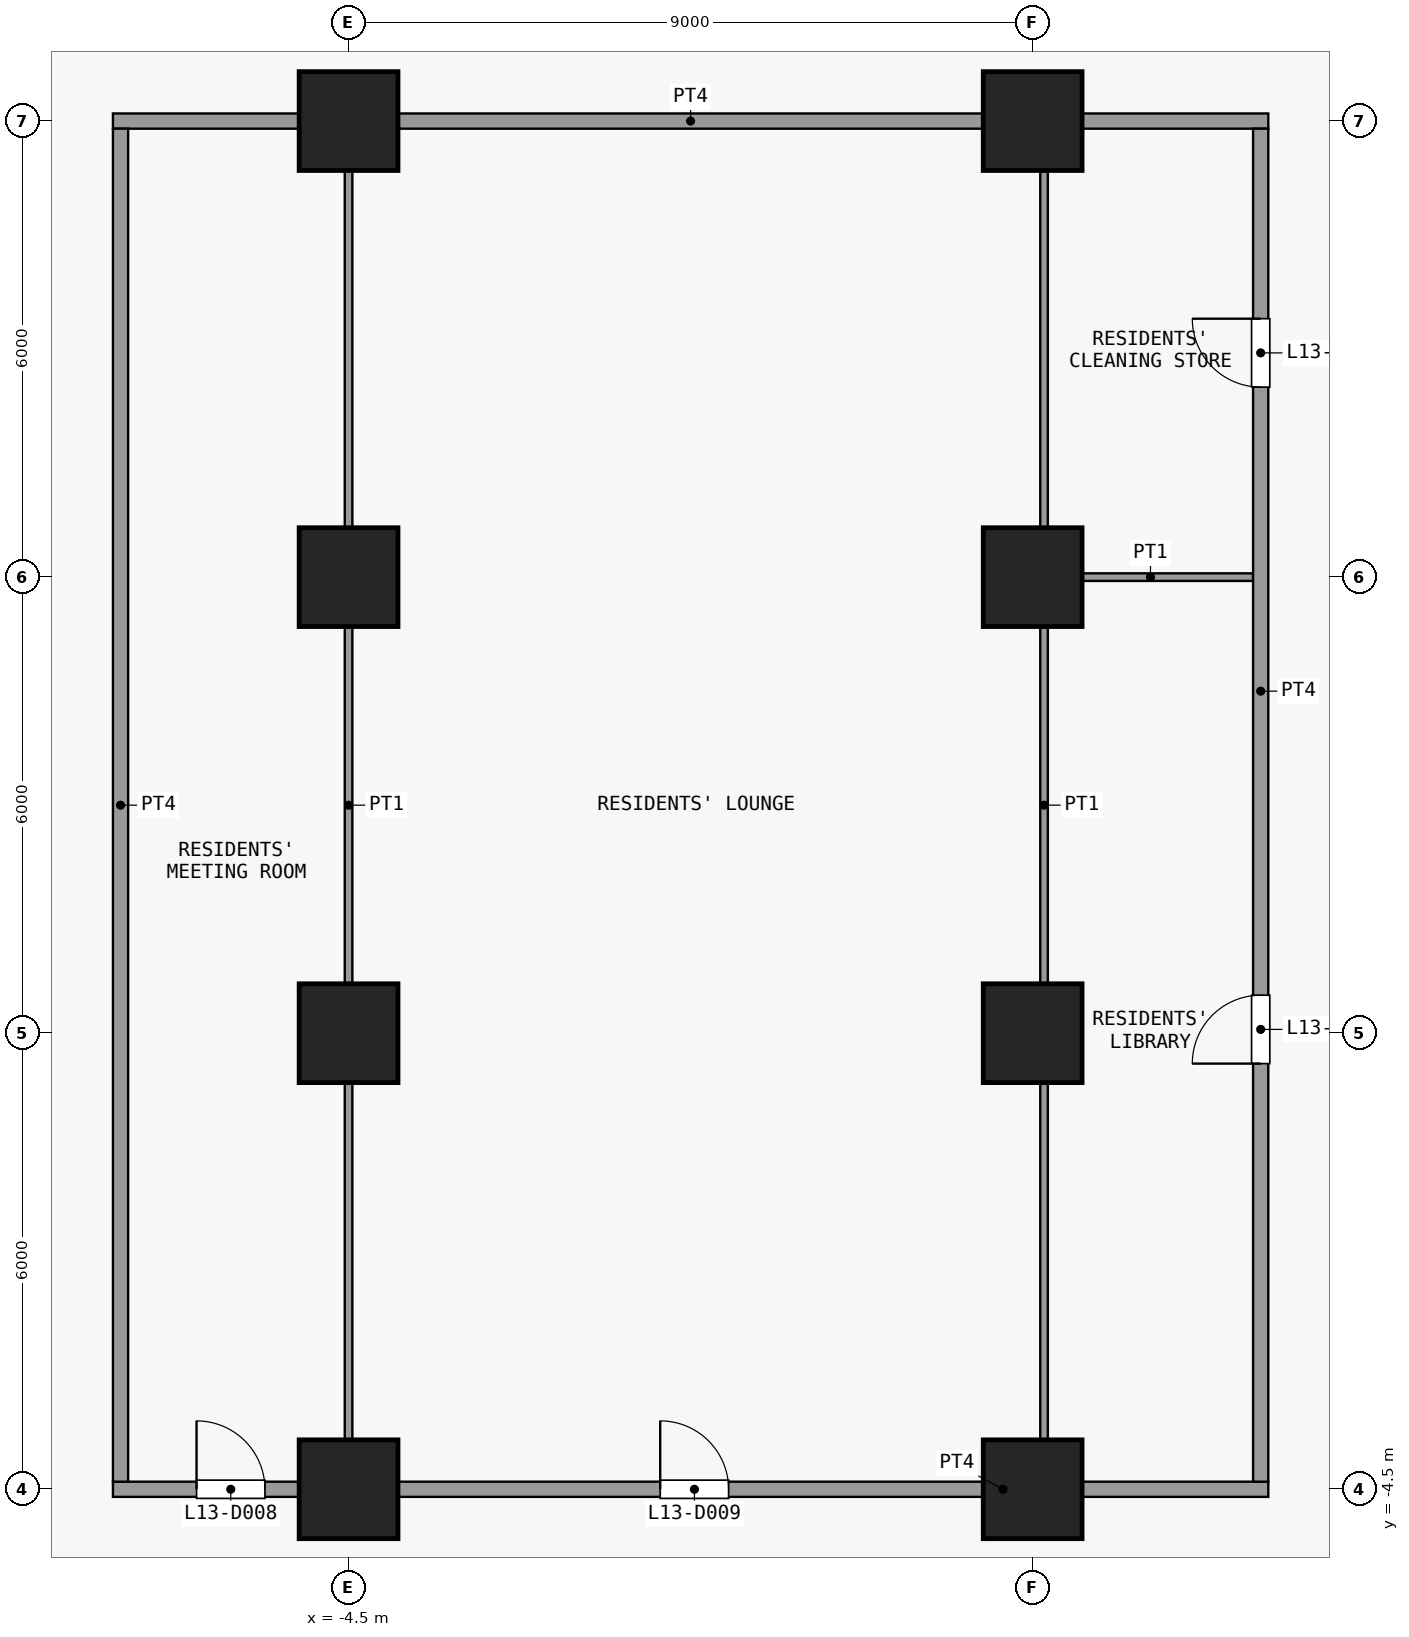
"""IFC4 building model, lengths in metres.
Left out: names, types, materials, properties, quantities, classifications, styles, units other than length and angle.
Written with IfcOpenShell. Run it as: python <this file> out.ifc"""

import sys

from ifc_helpers import new_model, si_unit, direction, frame, frame_2d, origin, origin_2d, place, context, subcontext, project, spatial, rectangle, extrude, element, fill, save


model = new_model("IFC4")
c1 = context("Model", 3, precision=1e-05, world=origin(), true_north=direction((0.0, 1.0)))
c2 = subcontext(c1, "Body", "Model", "MODEL_VIEW")
j1 = project(units=[si_unit("LENGTHUNIT", "METRE"), si_unit("PLANEANGLEUNIT", "RADIAN")], contexts=[c1])
p1 = place(None, origin())
s1 = spatial("IfcSite", under=j1, at=p1, CompositionType="ELEMENT")
p2 = place(p1, origin())
s2 = spatial("IfcBuilding", under=s1, at=p2, CompositionType="ELEMENT")
p3 = place(p2, frame((0.0, 0.0, 57.7)))
s3 = spatial("IfcBuildingStorey", under=s2, at=p3, CompositionType="ELEMENT", Elevation=57.7)
for number, where, z_axis, x_axis in (
    (1, (-4.5, -4.5, 0.0), (0.0, 0.0, 1.0), (1.0, 0.0, 0.0)),
    (2, (-4.5, 1.5, 0.0), (0.0, 0.0, 1.0), (1.0, 0.0, 0.0)),
    (3, (-4.5, 7.5, 0.0), (0.0, 0.0, 1.0), (1.0, 0.0, 0.0)),
    (4, (-4.5, 13.5, 0.0), (0.0, 0.0, 1.0), (1.0, 0.0, 0.0)),
    (5, (4.5, -4.5, 0.0), (0.0, 0.0, 1.0), (1.0, 0.0, 0.0)),
    (6, (4.5, 1.5, 0.0), (0.0, 0.0, 1.0), (1.0, 0.0, 0.0)),
    (7, (4.5, 7.5, 0.0), (0.0, 0.0, 1.0), (1.0, 0.0, 0.0)),
    (8, (4.5, 13.5, 0.0), (0.0, 0.0, 1.0), (1.0, 0.0, 0.0)),
):
    element("IfcColumn", number, at=place(p3, frame(where, z_axis=z_axis, x_axis=x_axis)), inside=s3, PredefinedType="COLUMN", context=c2, shape_type="SweptSolid", body=[
        extrude(rectangle(XDim=1.3, YDim=1.3, at=origin_2d()), origin(), (0.0, 0.0, 1.0), 3.6),
    ])
p4 = place(p3, frame((-7.6, -4.5, 0.0), z_axis=(0.0, 0.0, 1.0), x_axis=(1.0, 0.0, 0.0)))
e9 = element("IfcWall", 9, at=p4, inside=s3, PredefinedType="PARTITIONING", context=c2, shape_type="SweptSolid", body=[
    extrude(rectangle(XDim=15.2, YDim=0.2, at=frame_2d((7.6, 0.0))), origin(), (0.0, 0.0, 1.0), 3.3),
])
p5 = place(p4, frame((1.1, 0.0, 0.0)))
e10 = element("IfcOpeningElement", 10, at=p5, cuts=e9, PredefinedType="OPENING", context=c2, shape_type="SweptSolid", body=[
    extrude(rectangle(XDim=0.9, YDim=2.1, at=frame_2d((0.45, 1.05))), frame((0.0, 0.11, 0.0), z_axis=(0.0, -1.0, 0.0), x_axis=(1.0, 0.0, 0.0)), (0.0, 0.0, 1.0), 0.22),
])
p6 = place(p4, frame((7.2, 0.0, 0.0)))
e11 = element("IfcOpeningElement", 11, at=p6, cuts=e9, PredefinedType="OPENING", context=c2, shape_type="SweptSolid", body=[
    extrude(rectangle(XDim=0.9, YDim=2.1, at=frame_2d((0.45, 1.05))), frame((0.0, 0.11, 0.0), z_axis=(0.0, -1.0, 0.0), x_axis=(1.0, 0.0, 0.0)), (0.0, 0.0, 1.0), 0.22),
])
p7 = place(p3, frame((4.7, 7.5, 0.0), z_axis=(0.0, 0.0, 1.0), x_axis=(1.0, 0.0, 0.0)))
e12 = element("IfcWall", 12, at=p7, inside=s3, PredefinedType="PARTITIONING", context=c2, shape_type="SweptSolid", body=[
    extrude(rectangle(XDim=2.7, YDim=0.1, at=frame_2d((1.35, 0.0))), origin(), (0.0, 0.0, 1.0), 3.3),
])
p8 = place(p3, frame((-7.6, 13.5, 0.0), z_axis=(0.0, 0.0, 1.0), x_axis=(1.0, 0.0, 0.0)))
e13 = element("IfcWall", 13, at=p8, inside=s3, PredefinedType="PARTITIONING", context=c2, shape_type="SweptSolid", body=[
    extrude(rectangle(XDim=15.2, YDim=0.2, at=frame_2d((7.6, 0.0))), origin(), (0.0, 0.0, 1.0), 3.3),
])
p9 = place(p3, frame((-7.5, -4.4, 0.0), z_axis=(0.0, 0.0, 1.0), x_axis=(0.0, 1.0, 0.0)))
e14 = element("IfcWall", 14, at=p9, inside=s3, PredefinedType="PARTITIONING", context=c2, shape_type="SweptSolid", body=[
    extrude(rectangle(XDim=17.8, YDim=0.2, at=frame_2d((8.9, 0.0))), origin(), (0.0, 0.0, 1.0), 3.3),
])
for number, where, z_axis, x_axis in (
    (15, (-4.5, -4.4, 0.0), (0.0, 0.0, 1.0), (0.0, 1.0, 0.0)),
    (16, (4.65, -4.4, 0.0), (0.0, 0.0, 1.0), (0.0, 1.0, 0.0)),
):
    element("IfcWall", number, at=place(p3, frame(where, z_axis=z_axis, x_axis=x_axis)), inside=s3, PredefinedType="PARTITIONING", context=c2, shape_type="SweptSolid", body=[
        extrude(rectangle(XDim=17.8, YDim=0.1, at=frame_2d((8.9, 0.0))), origin(), (0.0, 0.0, 1.0), 3.3),
    ])
p10 = place(p3, frame((7.5, -4.4, 0.0), z_axis=(0.0, 0.0, 1.0), x_axis=(0.0, 1.0, 0.0)))
e17 = element("IfcWall", 17, at=p10, inside=s3, PredefinedType="PARTITIONING", context=c2, shape_type="SweptSolid", body=[
    extrude(rectangle(XDim=17.8, YDim=0.2, at=frame_2d((8.9, 0.0))), origin(), (0.0, 0.0, 1.0), 3.3),
])
p11 = place(p10, frame((5.5, 0.0, 0.0)))
e18 = element("IfcOpeningElement", 18, at=p11, cuts=e17, PredefinedType="OPENING", context=c2, shape_type="SweptSolid", body=[
    extrude(rectangle(XDim=0.9, YDim=2.1, at=frame_2d((0.45, 1.05))), frame((0.0, 0.11, 0.0), z_axis=(0.0, -1.0, 0.0), x_axis=(1.0, 0.0, 0.0)), (0.0, 0.0, 1.0), 0.22),
])
p12 = place(p10, frame((14.4, 0.0, 0.0)))
e19 = element("IfcOpeningElement", 19, at=p12, cuts=e17, PredefinedType="OPENING", context=c2, shape_type="SweptSolid", body=[
    extrude(rectangle(XDim=0.9, YDim=2.1, at=frame_2d((0.45, 1.05))), frame((0.0, 0.11, 0.0), z_axis=(0.0, -1.0, 0.0), x_axis=(1.0, 0.0, 0.0)), (0.0, 0.0, 1.0), 0.22),
])
p13 = place(p5, origin())
e20 = element("IfcDoor", 20, at=p13, inside=s3, OperationType="SINGLE_SWING_RIGHT", PredefinedType="DOOR", context=c2, shape_type="SweptSolid", body=[
    extrude(rectangle(XDim=0.9, YDim=2.1, at=frame_2d((0.45, 1.05))), frame((0.0, 0.025, 0.0), z_axis=(0.0, -1.0, 0.0), x_axis=(1.0, 0.0, 0.0)), (0.0, 0.0, 1.0), 0.05),
])
fill(e10, e20)
p14 = place(p6, origin())
e21 = element("IfcDoor", 21, at=p14, inside=s3, OperationType="SINGLE_SWING_RIGHT", PredefinedType="DOOR", context=c2, shape_type="SweptSolid", body=[
    extrude(rectangle(XDim=0.9, YDim=2.1, at=frame_2d((0.45, 1.05))), frame((0.0, 0.025, 0.0), z_axis=(0.0, -1.0, 0.0), x_axis=(1.0, 0.0, 0.0)), (0.0, 0.0, 1.0), 0.05),
])
fill(e11, e21)
p15 = place(p11, origin())
e22 = element("IfcDoor", 22, at=p15, inside=s3, OperationType="SINGLE_SWING_RIGHT", PredefinedType="DOOR", context=c2, shape_type="SweptSolid", body=[
    extrude(rectangle(XDim=0.9, YDim=2.1, at=frame_2d((0.45, 1.05))), frame((0.0, 0.025, 0.0), z_axis=(0.0, -1.0, 0.0), x_axis=(1.0, 0.0, 0.0)), (0.0, 0.0, 1.0), 0.05),
])
fill(e18, e22)
p16 = place(p12, origin())
e23 = element("IfcDoor", 23, at=p16, inside=s3, OperationType="SINGLE_SWING_LEFT", PredefinedType="DOOR", context=c2, shape_type="SweptSolid", body=[
    extrude(rectangle(XDim=0.9, YDim=2.1, at=frame_2d((0.45, 1.05))), frame((0.0, 0.025, 0.0), z_axis=(0.0, -1.0, 0.0), x_axis=(1.0, 0.0, 0.0)), (0.0, 0.0, 1.0), 0.05),
])
fill(e19, e23)
save(model, sys.argv[1])
